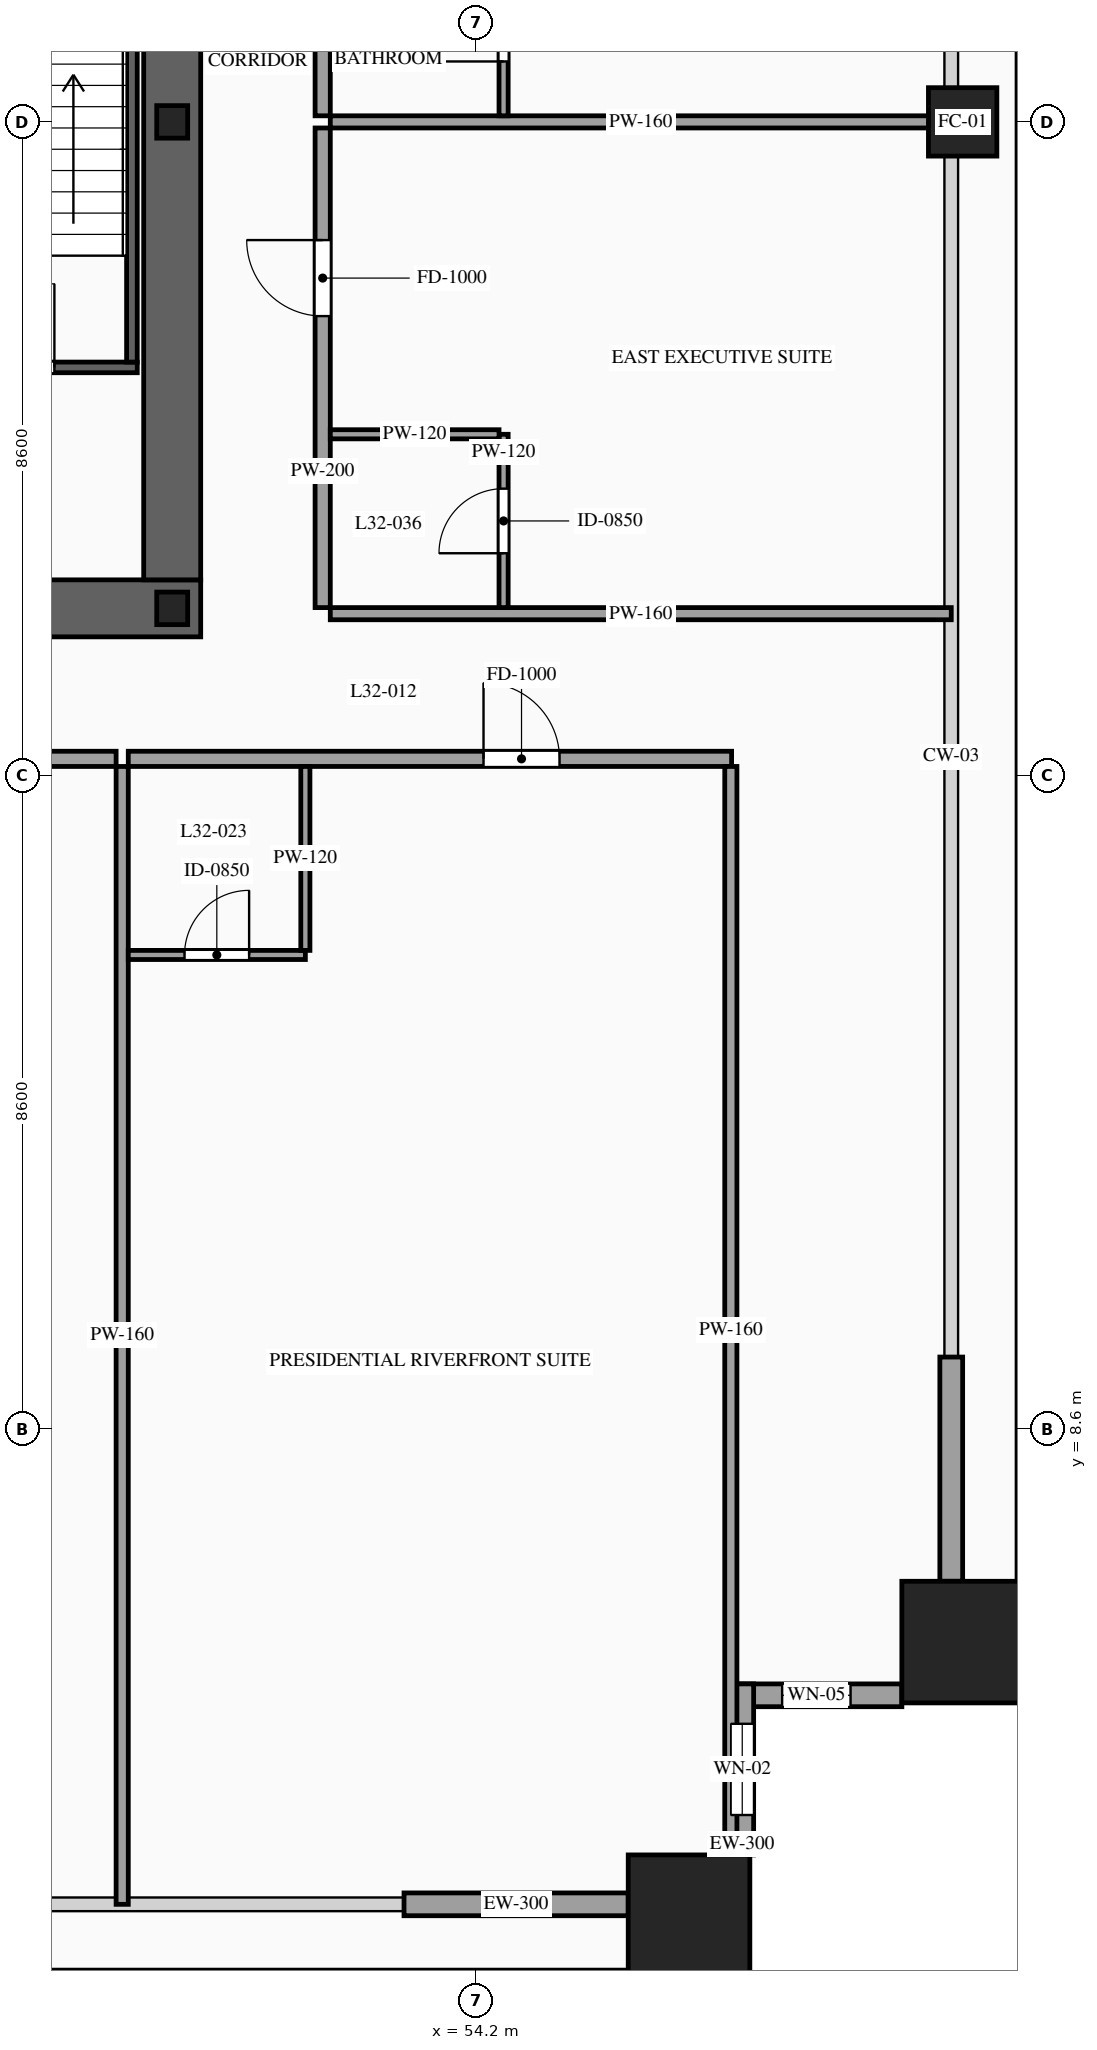
"""IFC4 building model, lengths in metres.
Left out: names, types, materials, properties, quantities, classifications, styles, units other than length and angle.
Written with IfcOpenShell. Run it as: python <this file> out.ifc"""

import sys

from ifc_helpers import new_model, si_unit, direction, frame, frame_2d, origin, origin_2d, place, context, subcontext, project, spatial, rectangle, hollow_rectangle, i_section, extrude, source, transform, mapped, element, fill, save


model = new_model("IFC4")
c1 = context("Model", 3, precision=1e-05, world=origin(), true_north=direction((0.0, 1.0)))
c2 = subcontext(c1, "Body", "Model", "MODEL_VIEW")
j1 = project(units=[si_unit("LENGTHUNIT", "METRE"), si_unit("PLANEANGLEUNIT", "RADIAN")], contexts=[c1])
p1 = place(None, origin())
s1 = spatial("IfcSite", under=j1, at=p1, CompositionType="ELEMENT")
p2 = place(p1, origin())
s2 = spatial("IfcBuilding", under=s1, at=p2, CompositionType="ELEMENT")
p3 = place(p2, frame((0.0, 0.0, 122.6)))
s3 = spatial("IfcBuildingStorey", under=s2, at=p3, CompositionType="ELEMENT", Elevation=122.6)
p4 = place(p3, frame((23.425, 19.4, 0.0), z_axis=(0.0, 0.0, 1.0), x_axis=(1.0, 0.0, 0.0)))
e1 = element("IfcWall", 1, at=p4, inside=s3, PredefinedType="SHEAR", context=c2, shape_type="SweptSolid", body=[
    extrude(rectangle(XDim=27.15, YDim=0.75, at=frame_2d((13.575, 0.0))), origin(), (0.0, 0.0, 1.0), 3.6),
])
p5 = place(p4, frame((2.025, 0.0, 0.0)))
e2 = element("IfcOpeningElement", 2, at=p5, cuts=e1, PredefinedType="OPENING", context=c2, shape_type="SweptSolid", body=[
    extrude(rectangle(XDim=1.1, YDim=2.2, at=frame_2d((0.55, 1.1))), frame((0.0, 0.39, 0.0), z_axis=(0.0, -1.0, 0.0), x_axis=(1.0, 0.0, 0.0)), (0.0, 0.0, 1.0), 0.78),
])
p6 = place(p4, frame((9.925, 0.0, 0.0)))
e3 = element("IfcOpeningElement", 3, at=p6, cuts=e1, PredefinedType="OPENING", context=c2, shape_type="SweptSolid", body=[
    extrude(rectangle(XDim=1.1, YDim=2.2, at=frame_2d((0.55, 1.1))), frame((0.0, 0.39, 0.0), z_axis=(0.0, -1.0, 0.0), x_axis=(1.0, 0.0, 0.0)), (0.0, 0.0, 1.0), 0.78),
])
p7 = place(p4, frame((23.125, 0.0, 0.0)))
e4 = element("IfcOpeningElement", 4, at=p7, cuts=e1, PredefinedType="OPENING", context=c2, shape_type="SweptSolid", body=[
    extrude(rectangle(XDim=1.1, YDim=2.2, at=frame_2d((0.55, 1.1))), frame((0.0, 0.39, 0.0), z_axis=(0.0, -1.0, 0.0), x_axis=(1.0, 0.0, 0.0)), (0.0, 0.0, 1.0), 0.78),
])
p8 = place(p4, frame((19.745, 0.0, 0.0)))
e5 = element("IfcOpeningElement", 5, at=p8, cuts=e1, PredefinedType="OPENING", context=c2, shape_type="SweptSolid", body=[
    extrude(rectangle(XDim=0.9, YDim=2.15, at=frame_2d((0.45, 1.075))), frame((0.0, 0.39, 0.0), z_axis=(0.0, -1.0, 0.0), x_axis=(1.0, 0.0, 0.0)), (0.0, 0.0, 1.0), 0.78),
])
p9 = place(p4, frame((18.305, 0.0, 0.0)))
e6 = element("IfcOpeningElement", 6, at=p9, cuts=e1, PredefinedType="OPENING", context=c2, shape_type="SweptSolid", body=[
    extrude(rectangle(XDim=0.9, YDim=2.15, at=frame_2d((0.45, 1.075))), frame((0.0, 0.39, 0.0), z_axis=(0.0, -1.0, 0.0), x_axis=(1.0, 0.0, 0.0)), (0.0, 0.0, 1.0), 0.78),
])
m1 = source(origin(), c2, "Body", "SweptSolid", [
    extrude(rectangle(XDim=12.05, YDim=0.75, at=frame_2d((6.025, 0.0))), origin(), (0.0, 0.0, 1.0), 3.6),
])
p10 = place(p3, frame((50.2, 19.775, 0.0), z_axis=(0.0, 0.0, 1.0), x_axis=(0.0, 1.0, 0.0)))
e7 = element("IfcWall", 7, at=p10, inside=s3, PredefinedType="SHEAR", context=c2, shape_type="MappedRepresentation", body=[
    mapped(m1, transform((0.0, 0.0, 0.0), scale=1.0)),
])
m2 = source(origin(), c2, "Body", "SweptSolid", [
    extrude(i_section(OverallWidth=0.407, OverallDepth=0.428, WebThickness=0.02, FlangeThickness=0.035, at=origin_2d()), origin(), (0.0, 0.0, 1.0), 3.6),
])
for number, where, z_axis, x_axis in (
    (8, (50.2, 19.4, 0.0), (0.0, 0.0, 1.0), (1.0, 0.0, 0.0)),
    (9, (50.2, 25.8, 0.0), (0.0, 0.0, 1.0), (1.0, 0.0, 0.0)),
):
    element("IfcColumn", number, at=place(p3, frame(where, z_axis=z_axis, x_axis=x_axis)), inside=s3, PredefinedType="COLUMN", context=c2, shape_type="MappedRepresentation", body=[
        mapped(m2, transform((0.0, 0.0, 0.0), scale=1.0)),
    ])
m3 = source(origin(), c2, "Body", "SweptSolid", [
    extrude(hollow_rectangle(XDim=1.6, YDim=1.6, WallThickness=0.07, at=origin_2d()), origin(), (0.0, 0.0, 1.0), 3.6),
])
for number, where, z_axis, x_axis in (
    (10, (57.0, 2.2, 0.0), (0.0, 0.0, 1.0), (1.0, 0.0, 0.0)),
    (11, (60.6, 5.8, 0.0), (0.0, 0.0, 1.0), (1.0, 0.0, 0.0)),
):
    element("IfcColumn", number, at=place(p3, frame(where, z_axis=z_axis, x_axis=x_axis)), inside=s3, PredefinedType="COLUMN", context=c2, shape_type="MappedRepresentation", body=[
        mapped(m3, transform((0.0, 0.0, 0.0), scale=1.0)),
    ])
m4 = source(origin(), c2, "Body", "SweptSolid", [
    extrude(hollow_rectangle(XDim=0.9, YDim=0.9, WallThickness=0.042, at=origin_2d()), origin(), (0.0, 0.0, 1.0), 3.6),
])
p11 = place(p3, frame((60.6, 25.8, 0.0), z_axis=(0.0, 0.0, 1.0), x_axis=(1.0, 0.0, 0.0)))
e12 = element("IfcColumn", 12, at=p11, inside=s3, PredefinedType="COLUMN", context=c2, shape_type="MappedRepresentation", body=[
    mapped(m4, transform((0.0, 0.0, 0.0), scale=1.0)),
])
p12 = place(p3, frame((57.55, 5.1, 0.0), z_axis=(0.0, 0.0, 1.0), x_axis=(1.0, 0.0, 0.0)))
e13 = element("IfcWall", 13, at=p12, inside=s3, PredefinedType="SOLIDWALL", context=c2, shape_type="SweptSolid", body=[
    extrude(rectangle(XDim=2.25, YDim=0.3, at=frame_2d((1.125, 0.0))), origin(), (0.0, 0.0, 1.0), 3.38),
])
p13 = place(p12, frame((0.675, 0.0, 0.85)))
e14 = element("IfcOpeningElement", 14, at=p13, cuts=e13, PredefinedType="OPENING", context=c2, shape_type="SweptSolid", body=[
    extrude(rectangle(XDim=0.9, YDim=1.5, at=frame_2d((0.45, 0.75))), frame((0.0, 0.165, 0.0), z_axis=(0.0, -1.0, 0.0), x_axis=(1.0, 0.0, 0.0)), (0.0, 0.0, 1.0), 0.33),
])
p14 = place(p3, frame((57.7, 3.0, 0.0), z_axis=(0.0, 0.0, 1.0), x_axis=(0.0, 1.0, 0.0)))
e15 = element("IfcWall", 15, at=p14, inside=s3, PredefinedType="SOLIDWALL", context=c2, shape_type="SweptSolid", body=[
    extrude(rectangle(XDim=2.25, YDim=0.3, at=frame_2d((1.125, 0.0))), origin(), (0.0, 0.0, 1.0), 3.38),
])
p15 = place(p14, frame((0.525, 0.0, 0.85)))
e16 = element("IfcOpeningElement", 16, at=p15, cuts=e15, PredefinedType="OPENING", context=c2, shape_type="SweptSolid", body=[
    extrude(rectangle(XDim=1.2, YDim=2.1, at=frame_2d((0.6, 1.05))), frame((0.0, 0.165, 0.0), z_axis=(0.0, -1.0, 0.0), x_axis=(1.0, 0.0, 0.0)), (0.0, 0.0, 1.0), 0.33),
])
m5 = source(origin(), c2, "Body", "SweptSolid", [
    extrude(rectangle(XDim=2.95, YDim=0.3, at=frame_2d((1.475, 0.0))), origin(), (0.0, 0.0, 1.0), 2.775),
])
for number, where, z_axis, x_axis in (
    (17, (53.25, 2.35, 0.0), (0.0, 0.0, 1.0), (1.0, 0.0, 0.0)),
    (18, (60.45, 6.6, 0.0), (0.0, 0.0, 1.0), (0.0, 1.0, 0.0)),
):
    element("IfcWall", number, at=place(p3, frame(where, z_axis=z_axis, x_axis=x_axis)), inside=s3, PredefinedType="SOLIDWALL", context=c2, shape_type="MappedRepresentation", body=[
        mapped(m5, transform((0.0, 0.0, 0.0), scale=1.0)),
    ])
p16 = place(p3, frame((46.46, 22.57, 0.0), z_axis=(0.0, 0.0, 1.0), x_axis=(1.0, 0.0, 0.0)))
e19 = element("IfcWall", 19, at=p16, inside=s3, PredefinedType="SOLIDWALL", context=c2, shape_type="SweptSolid", body=[
    extrude(rectangle(XDim=3.28, YDim=0.14, at=frame_2d((1.64, 0.0))), origin(), (0.0, 0.0, 1.0), 3.38),
])
p17 = place(p16, frame((1.09, 0.0, 0.0)))
e20 = element("IfcOpeningElement", 20, at=p17, cuts=e19, PredefinedType="OPENING", context=c2, shape_type="SweptSolid", body=[
    extrude(rectangle(XDim=1.1, YDim=2.2, at=frame_2d((0.55, 1.1))), frame((0.0, 0.085, 0.0), z_axis=(0.0, -1.0, 0.0), x_axis=(1.0, 0.0, 0.0)), (0.0, 0.0, 1.0), 0.17),
])
m6 = source(origin(), c2, "Body", "SweptSolid", [
    extrude(rectangle(XDim=8.94, YDim=0.14, at=frame_2d((4.47, 0.0))), origin(), (0.0, 0.0, 1.0), 3.38),
])
p18 = place(p3, frame((49.67, 22.64, 0.0), z_axis=(0.0, 0.0, 1.0), x_axis=(0.0, 1.0, 0.0)))
e21 = element("IfcWall", 21, at=p18, inside=s3, PredefinedType="SOLIDWALL", context=c2, shape_type="MappedRepresentation", body=[
    mapped(m6, transform((0.0, 0.0, 0.0), scale=1.0)),
])
p19 = place(p3, frame((35.723, 17.42, 0.0), z_axis=(0.0, 0.0, 1.0), x_axis=(1.0, 0.0, 0.0)))
e22 = element("IfcWall", 22, at=p19, inside=s3, PredefinedType="PARTITIONING", context=c2, shape_type="SweptSolid", body=[
    extrude(rectangle(XDim=13.739, YDim=0.2, at=frame_2d((6.87, 0.0))), origin(), (0.0, 0.0, 1.0), 3.38),
])
p20 = place(p19, frame((7.574, 0.0, 0.0)))
e23 = element("IfcOpeningElement", 23, at=p20, cuts=e22, PredefinedType="OPENING", context=c2, shape_type="SweptSolid", body=[
    extrude(rectangle(XDim=1.0, YDim=2.2, at=frame_2d((0.5, 1.1))), frame((0.0, 0.115, 0.0), z_axis=(0.0, -1.0, 0.0), x_axis=(1.0, 0.0, 0.0)), (0.0, 0.0, 1.0), 0.23),
])
m7 = source(origin(), c2, "Body", "SweptSolid", [
    extrude(rectangle(XDim=14.97, YDim=0.16, at=frame_2d((7.485, 0.0))), origin(), (0.0, 0.0, 1.0), 3.38),
])
p21 = place(p3, frame((49.542, 2.35, 0.0), z_axis=(0.0, 0.0, 1.0), x_axis=(0.0, 1.0, 0.0)))
e24 = element("IfcWall", 24, at=p21, inside=s3, PredefinedType="PARTITIONING", context=c2, shape_type="MappedRepresentation", body=[
    mapped(m7, transform((0.0, 0.0, 0.0), scale=1.0)),
])
p22 = place(p3, frame((49.622, 17.42, 0.0), z_axis=(0.0, 0.0, 1.0), x_axis=(1.0, 0.0, 0.0)))
e25 = element("IfcWall", 25, at=p22, inside=s3, PredefinedType="PARTITIONING", context=c2, shape_type="SweptSolid", body=[
    extrude(rectangle(XDim=7.938, YDim=0.2, at=frame_2d((3.969, 0.0))), origin(), (0.0, 0.0, 1.0), 3.38),
])
p23 = place(p22, frame((4.674, 0.0, 0.0)))
e26 = element("IfcOpeningElement", 26, at=p23, cuts=e25, PredefinedType="OPENING", context=c2, shape_type="SweptSolid", body=[
    extrude(rectangle(XDim=1.0, YDim=2.2, at=frame_2d((0.5, 1.1))), frame((0.0, 0.115, 0.0), z_axis=(0.0, -1.0, 0.0), x_axis=(1.0, 0.0, 0.0)), (0.0, 0.0, 1.0), 0.23),
])
m8 = source(origin(), c2, "Body", "SweptSolid", [
    extrude(rectangle(XDim=14.82, YDim=0.16, at=frame_2d((7.41, 0.0))), origin(), (0.0, 0.0, 1.0), 3.38),
])
p24 = place(p3, frame((57.55, 2.5, 0.0), z_axis=(0.0, 0.0, 1.0), x_axis=(0.0, 1.0, 0.0)))
e27 = element("IfcWall", 27, at=p24, inside=s3, PredefinedType="PARTITIONING", context=c2, shape_type="MappedRepresentation", body=[
    mapped(m8, transform((0.0, 0.0, 0.0), scale=1.0)),
])
p25 = place(p3, frame((49.622, 14.84, 0.0), z_axis=(0.0, 0.0, 1.0), x_axis=(1.0, 0.0, 0.0)))
e28 = element("IfcWall", 28, at=p25, inside=s3, PredefinedType="PARTITIONING", context=c2, shape_type="SweptSolid", body=[
    extrude(rectangle(XDim=2.33, YDim=0.12, at=frame_2d((1.165, 0.0))), origin(), (0.0, 0.0, 1.0), 3.38),
])
p26 = place(p25, frame((0.74, 0.0, 0.0)))
e29 = element("IfcOpeningElement", 29, at=p26, cuts=e28, PredefinedType="OPENING", context=c2, shape_type="SweptSolid", body=[
    extrude(rectangle(XDim=0.85, YDim=2.1, at=frame_2d((0.425, 1.05))), frame((0.0, 0.075, 0.0), z_axis=(0.0, -1.0, 0.0), x_axis=(1.0, 0.0, 0.0)), (0.0, 0.0, 1.0), 0.15),
])
m9 = source(origin(), c2, "Body", "SweptSolid", [
    extrude(rectangle(XDim=2.42, YDim=0.12, at=frame_2d((1.21, 0.0))), origin(), (0.0, 0.0, 1.0), 3.38),
])
p27 = place(p3, frame((51.952, 14.9, 0.0), z_axis=(0.0, 0.0, 1.0), x_axis=(0.0, 1.0, 0.0)))
e30 = element("IfcWall", 30, at=p27, inside=s3, PredefinedType="PARTITIONING", context=c2, shape_type="MappedRepresentation", body=[
    mapped(m9, transform((0.0, 0.0, 0.0), scale=1.0)),
])
p28 = place(p3, frame((52.18, 19.41, 0.0), z_axis=(0.0, 0.0, 1.0), x_axis=(0.0, 1.0, 0.0)))
e31 = element("IfcWall", 31, at=p28, inside=s3, PredefinedType="PARTITIONING", context=c2, shape_type="SweptSolid", body=[
    extrude(rectangle(XDim=6.31, YDim=0.2, at=frame_2d((3.155, 0.0))), origin(), (0.0, 0.0, 1.0), 3.38),
])
p29 = place(p28, frame((3.835, 0.0, 0.0)))
e32 = element("IfcOpeningElement", 32, at=p29, cuts=e31, PredefinedType="OPENING", context=c2, shape_type="SweptSolid", body=[
    extrude(rectangle(XDim=1.0, YDim=2.2, at=frame_2d((0.5, 1.1))), frame((0.0, 0.115, 0.0), z_axis=(0.0, -1.0, 0.0), x_axis=(1.0, 0.0, 0.0)), (0.0, 0.0, 1.0), 0.23),
])
m10 = source(origin(), c2, "Body", "SweptSolid", [
    extrude(rectangle(XDim=8.17, YDim=0.16, at=frame_2d((4.085, 0.0))), origin(), (0.0, 0.0, 1.0), 2.675),
])
p30 = place(p3, frame((52.28, 25.8, 0.0), z_axis=(0.0, 0.0, 1.0), x_axis=(1.0, 0.0, 0.0)))
e33 = element("IfcWall", 33, at=p30, inside=s3, PredefinedType="PARTITIONING", context=c2, shape_type="MappedRepresentation", body=[
    mapped(m10, transform((0.0, 0.0, 0.0), scale=1.0)),
])
m11 = source(origin(), c2, "Body", "SweptSolid", [
    extrude(rectangle(XDim=8.17, YDim=0.16, at=frame_2d((4.085, 0.0))), origin(), (0.0, 0.0, 1.0), 2.875),
])
p31 = place(p3, frame((52.28, 19.33, 0.0), z_axis=(0.0, 0.0, 1.0), x_axis=(1.0, 0.0, 0.0)))
e34 = element("IfcWall", 34, at=p31, inside=s3, PredefinedType="PARTITIONING", context=c2, shape_type="MappedRepresentation", body=[
    mapped(m11, transform((0.0, 0.0, 0.0), scale=1.0)),
])
p32 = place(p3, frame((54.56, 19.41, 0.0), z_axis=(0.0, 0.0, 1.0), x_axis=(0.0, 1.0, 0.0)))
e35 = element("IfcWall", 35, at=p32, inside=s3, PredefinedType="PARTITIONING", context=c2, shape_type="SweptSolid", body=[
    extrude(rectangle(XDim=2.28, YDim=0.12, at=frame_2d((1.14, 0.0))), origin(), (0.0, 0.0, 1.0), 3.38),
])
p33 = place(p32, frame((0.715, 0.0, 0.0)))
e36 = element("IfcOpeningElement", 36, at=p33, cuts=e35, PredefinedType="OPENING", context=c2, shape_type="SweptSolid", body=[
    extrude(rectangle(XDim=0.85, YDim=2.1, at=frame_2d((0.425, 1.05))), frame((0.0, 0.075, 0.0), z_axis=(0.0, -1.0, 0.0), x_axis=(1.0, 0.0, 0.0)), (0.0, 0.0, 1.0), 0.15),
])
m12 = source(origin(), c2, "Body", "SweptSolid", [
    extrude(rectangle(XDim=2.22, YDim=0.12, at=frame_2d((1.11, 0.0))), origin(), (0.0, 0.0, 1.0), 3.38),
])
p34 = place(p3, frame((52.28, 21.69, 0.0), z_axis=(0.0, 0.0, 1.0), x_axis=(1.0, 0.0, 0.0)))
e37 = element("IfcWall", 37, at=p34, inside=s3, PredefinedType="PARTITIONING", context=c2, shape_type="MappedRepresentation", body=[
    mapped(m12, transform((0.0, 0.0, 0.0), scale=1.0)),
])
p35 = place(p3, frame((52.18, 25.88, 0.0), z_axis=(0.0, 0.0, 1.0), x_axis=(0.0, 1.0, 0.0)))
e38 = element("IfcWall", 38, at=p35, inside=s3, PredefinedType="PARTITIONING", context=c2, shape_type="SweptSolid", body=[
    extrude(rectangle(XDim=6.31, YDim=0.2, at=frame_2d((3.155, 0.0))), origin(), (0.0, 0.0, 1.0), 3.38),
])
p36 = place(p35, frame((3.835, 0.0, 0.0)))
e39 = element("IfcOpeningElement", 39, at=p36, cuts=e38, PredefinedType="OPENING", context=c2, shape_type="SweptSolid", body=[
    extrude(rectangle(XDim=1.0, YDim=2.2, at=frame_2d((0.5, 1.1))), frame((0.0, 0.115, 0.0), z_axis=(0.0, -1.0, 0.0), x_axis=(1.0, 0.0, 0.0)), (0.0, 0.0, 1.0), 0.23),
])
p37 = place(p3, frame((54.56, 25.88, 0.0), z_axis=(0.0, 0.0, 1.0), x_axis=(0.0, 1.0, 0.0)))
e40 = element("IfcWall", 40, at=p37, inside=s3, PredefinedType="PARTITIONING", context=c2, shape_type="SweptSolid", body=[
    extrude(rectangle(XDim=2.28, YDim=0.12, at=frame_2d((1.14, 0.0))), origin(), (0.0, 0.0, 1.0), 3.38),
])
p38 = place(p37, frame((0.715, 0.0, 0.0)))
e41 = element("IfcOpeningElement", 41, at=p38, cuts=e40, PredefinedType="OPENING", context=c2, shape_type="SweptSolid", body=[
    extrude(rectangle(XDim=0.85, YDim=2.1, at=frame_2d((0.425, 1.05))), frame((0.0, 0.075, 0.0), z_axis=(0.0, -1.0, 0.0), x_axis=(1.0, 0.0, 0.0)), (0.0, 0.0, 1.0), 0.15),
])
m13 = source(origin(), c2, "Body", "SweptSolid", [
    extrude(rectangle(XDim=0.9, YDim=1.5, at=frame_2d((0.45, 0.75))), frame((0.0, 0.03, 0.0), z_axis=(0.0, -1.0, 0.0), x_axis=(1.0, 0.0, 0.0)), (0.0, 0.0, 1.0), 0.06),
])
p39 = place(p13, origin())
e42 = element("IfcWindow", 42, at=p39, inside=s3, PartitioningType="SINGLE_PANEL", PredefinedType="WINDOW", context=c2, shape_type="MappedRepresentation", body=[
    mapped(m13, transform((0.0, 0.0, 0.0), scale=1.0)),
])
fill(e14, e42)
m14 = source(origin(), c2, "Body", "SweptSolid", [
    extrude(rectangle(XDim=1.2, YDim=2.1, at=frame_2d((0.6, 1.05))), frame((0.0, 0.03, 0.0), z_axis=(0.0, -1.0, 0.0), x_axis=(1.0, 0.0, 0.0)), (0.0, 0.0, 1.0), 0.06),
])
p40 = place(p15, origin())
e43 = element("IfcWindow", 43, at=p40, inside=s3, PartitioningType="SINGLE_PANEL", PredefinedType="WINDOW", context=c2, shape_type="MappedRepresentation", body=[
    mapped(m14, transform((0.0, 0.0, 0.0), scale=1.0)),
])
fill(e16, e43)
m15 = source(origin(), c2, "Body", "SweptSolid", [
    extrude(rectangle(XDim=1.1, YDim=2.2, at=frame_2d((0.55, 1.1))), frame((0.0, 0.025, 0.0), z_axis=(0.0, -1.0, 0.0), x_axis=(1.0, 0.0, 0.0)), (0.0, 0.0, 1.0), 0.05),
])
p41 = place(p17, origin())
e44 = element("IfcDoor", 44, at=p41, inside=s3, OperationType="SINGLE_SWING_RIGHT", PredefinedType="DOOR", context=c2, shape_type="MappedRepresentation", body=[
    mapped(m15, transform((0.0, 0.0, 0.0), scale=1.0)),
])
fill(e20, e44)
m16 = source(origin(), c2, "Body", "SweptSolid", [
    extrude(rectangle(XDim=1.0, YDim=2.2, at=frame_2d((0.5, 1.1))), frame((0.0, 0.025, 0.0), z_axis=(0.0, -1.0, 0.0), x_axis=(1.0, 0.0, 0.0)), (0.0, 0.0, 1.0), 0.05),
])
p42 = place(p23, origin())
e45 = element("IfcDoor", 45, at=p42, inside=s3, OperationType="SINGLE_SWING_LEFT", PredefinedType="DOOR", context=c2, shape_type="MappedRepresentation", body=[
    mapped(m16, transform((0.0, 0.0, 0.0), scale=1.0)),
])
fill(e26, e45)
m17 = source(origin(), c2, "Body", "SweptSolid", [
    extrude(rectangle(XDim=0.85, YDim=2.1, at=frame_2d((0.425, 1.05))), frame((0.0, 0.025, 0.0), z_axis=(0.0, -1.0, 0.0), x_axis=(1.0, 0.0, 0.0)), (0.0, 0.0, 1.0), 0.05),
])
p43 = place(p26, origin())
e46 = element("IfcDoor", 46, at=p43, inside=s3, OperationType="SINGLE_SWING_RIGHT", PredefinedType="DOOR", context=c2, shape_type="MappedRepresentation", body=[
    mapped(m17, transform((0.0, 0.0, 0.0), scale=1.0)),
])
fill(e29, e46)
p44 = place(p29, origin())
e47 = element("IfcDoor", 47, at=p44, inside=s3, OperationType="SINGLE_SWING_RIGHT", PredefinedType="DOOR", context=c2, shape_type="MappedRepresentation", body=[
    mapped(m16, transform((0.0, 0.0, 0.0), scale=1.0)),
])
fill(e32, e47)
p45 = place(p33, origin())
e48 = element("IfcDoor", 48, at=p45, inside=s3, OperationType="SINGLE_SWING_LEFT", PredefinedType="DOOR", context=c2, shape_type="MappedRepresentation", body=[
    mapped(m17, transform((0.0, 0.0, 0.0), scale=1.0)),
])
fill(e36, e48)
p46 = place(p38, origin())
e49 = element("IfcDoor", 49, at=p46, inside=s3, OperationType="SINGLE_SWING_LEFT", PredefinedType="DOOR", context=c2, shape_type="MappedRepresentation", body=[
    mapped(m17, transform((0.0, 0.0, 0.0), scale=1.0)),
])
fill(e41, e49)
save(model, sys.argv[1])
